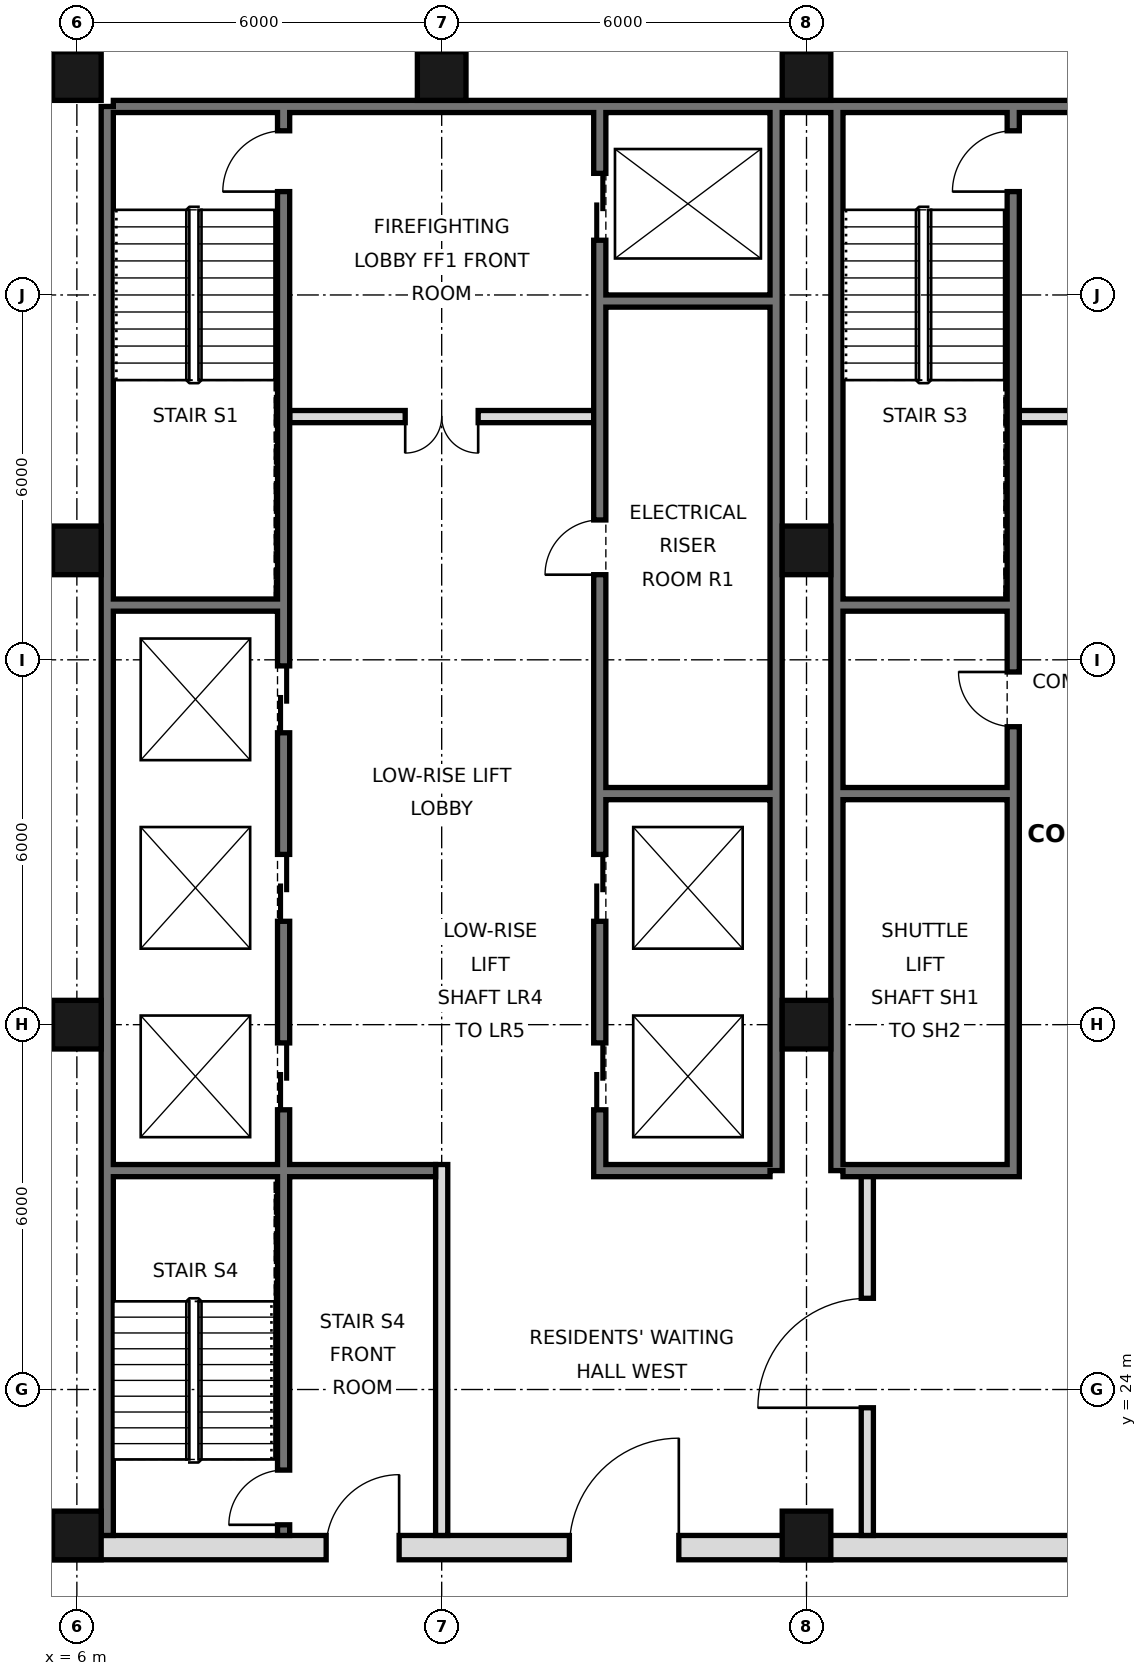
"""IFC4 building model, lengths in metres.
Left out: names, types, materials, properties, quantities, classifications, styles, units other than length and angle.
Written with IfcOpenShell. Run it as: python <this file> out.ifc"""

import sys

from ifc_helpers import new_model, si_unit, direction, frame, frame_2d, origin, origin_2d, place, context, subcontext, project, spatial, rectangle, hollow_rectangle, extrude, element, fill, save


model = new_model("IFC4")
c1 = context("Model", 3, precision=1e-05, world=origin(), true_north=direction((0.0, 1.0)))
c2 = subcontext(c1, "Body", "Model", "MODEL_VIEW")
j1 = project(units=[si_unit("LENGTHUNIT", "METRE"), si_unit("PLANEANGLEUNIT", "RADIAN")], contexts=[c1])
p1 = place(None, origin())
s1 = spatial("IfcSite", under=j1, at=p1, CompositionType="ELEMENT")
p2 = place(p1, origin())
s2 = spatial("IfcBuilding", under=s1, at=p2, CompositionType="ELEMENT")
p3 = place(p2, frame((0.0, 0.0, 107.0)))
s3 = spatial("IfcBuildingStorey", under=s2, at=p3, CompositionType="ELEMENT", Elevation=107.0)
for number, where, z_axis, x_axis in (
    (1, (6.0, 21.6, 0.0), (0.0, 0.0, 1.0), (1.0, 0.0, 0.0)),
    (2, (6.0, 30.0, 0.0), (0.0, 0.0, 1.0), (1.0, 0.0, 0.0)),
    (3, (6.0, 37.8, 0.0), (0.0, 0.0, 1.0), (1.0, 0.0, 0.0)),
    (4, (6.0, 45.6, 0.0), (0.0, 0.0, 1.0), (1.0, 0.0, 0.0)),
    (5, (12.0, 45.6, 0.0), (0.0, 0.0, 1.0), (1.0, 0.0, 0.0)),
    (6, (18.0, 21.6, 0.0), (0.0, 0.0, 1.0), (1.0, 0.0, 0.0)),
    (7, (18.0, 30.0, 0.0), (0.0, 0.0, 1.0), (1.0, 0.0, 0.0)),
    (8, (18.0, 37.8, 0.0), (0.0, 0.0, 1.0), (1.0, 0.0, 0.0)),
    (9, (18.0, 45.6, 0.0), (0.0, 0.0, 1.0), (1.0, 0.0, 0.0)),
):
    element("IfcColumn", number, at=place(p3, frame(where, z_axis=z_axis, x_axis=x_axis)), inside=s3, PredefinedType="COLUMN", context=c2, shape_type="SweptSolid", body=[
        extrude(hollow_rectangle(XDim=0.8, YDim=0.8, WallThickness=0.05, at=origin_2d()), origin(), (0.0, 0.0, 1.0), 3.6),
    ])
p4 = place(p3, frame((6.5, 21.6, 0.0), z_axis=(0.0, 0.0, 1.0), x_axis=(0.0, 1.0, 0.0)))
e10 = element("IfcWall", 10, at=p4, inside=s3, PredefinedType="SOLIDWALL", context=c2, shape_type="SweptSolid", body=[
    extrude(rectangle(XDim=23.5, YDim=0.2, at=frame_2d((11.75, 0.0))), origin(), (0.0, 0.0, 1.0), 3.42),
])
p5 = place(p3, frame((6.6, 45.1, 0.0), z_axis=(0.0, 0.0, 1.0), x_axis=(1.0, 0.0, 0.0)))
e11 = element("IfcWall", 11, at=p5, inside=s3, PredefinedType="SOLIDWALL", context=c2, shape_type="SweptSolid", body=[
    extrude(rectangle(XDim=34.8, YDim=0.2, at=frame_2d((17.4, 0.0))), origin(), (0.0, 0.0, 1.0), 3.42),
])
for number, where, z_axis, x_axis in (
    (12, (17.5, 27.6, 0.0), (0.0, 0.0, 1.0), (0.0, 1.0, 0.0)),
    (13, (18.5, 27.6, 0.0), (0.0, 0.0, 1.0), (0.0, 1.0, 0.0)),
):
    element("IfcWall", number, at=place(p3, frame(where, z_axis=z_axis, x_axis=x_axis)), inside=s3, PredefinedType="SOLIDWALL", context=c2, shape_type="SweptSolid", body=[
        extrude(rectangle(XDim=17.5, YDim=0.2, at=frame_2d((8.75, 0.0))), origin(), (0.0, 0.0, 1.0), 3.42),
    ])
p6 = place(p3, frame((5.6, 21.4, 0.0), z_axis=(0.0, 0.0, 1.0), x_axis=(1.0, 0.0, 0.0)))
e14 = element("IfcWall", 14, at=p6, inside=s3, PredefinedType="SOLIDWALL", context=c2, shape_type="SweptSolid", body=[
    extrude(rectangle(XDim=36.8, YDim=0.4, at=frame_2d((18.4, 0.0))), origin(), (0.0, 0.0, 1.0), 3.42),
])
p7 = place(p6, frame((8.5, 0.0, 0.0)))
e15 = element("IfcOpeningElement", 15, at=p7, cuts=e14, PredefinedType="OPENING", context=c2, shape_type="SweptSolid", body=[
    extrude(rectangle(XDim=1.8, YDim=2.1, at=frame_2d((0.9, 1.05))), frame((0.0, 0.21, 0.0), z_axis=(0.0, -1.0, 0.0), x_axis=(1.0, 0.0, 0.0)), (0.0, 0.0, 1.0), 0.42),
])
p8 = place(p6, frame((17.5, 0.0, 0.0)))
e16 = element("IfcOpeningElement", 16, at=p8, cuts=e14, PredefinedType="OPENING", context=c2, shape_type="SweptSolid", body=[
    extrude(rectangle(XDim=1.8, YDim=2.1, at=frame_2d((0.9, 1.05))), frame((0.0, 0.21, 0.0), z_axis=(0.0, -1.0, 0.0), x_axis=(1.0, 0.0, 0.0)), (0.0, 0.0, 1.0), 0.42),
])
p9 = place(p6, frame((26.5, 0.0, 0.0)))
e17 = element("IfcOpeningElement", 17, at=p9, cuts=e14, PredefinedType="OPENING", context=c2, shape_type="SweptSolid", body=[
    extrude(rectangle(XDim=1.8, YDim=2.1, at=frame_2d((0.9, 1.05))), frame((0.0, 0.21, 0.0), z_axis=(0.0, -1.0, 0.0), x_axis=(1.0, 0.0, 0.0)), (0.0, 0.0, 1.0), 0.42),
])
p10 = place(p6, frame((4.5, 0.0, 0.0)))
e18 = element("IfcOpeningElement", 18, at=p10, cuts=e14, PredefinedType="OPENING", context=c2, shape_type="SweptSolid", body=[
    extrude(rectangle(XDim=1.2, YDim=2.1, at=frame_2d((0.6, 1.05))), frame((0.0, 0.21, 0.0), z_axis=(0.0, -1.0, 0.0), x_axis=(1.0, 0.0, 0.0)), (0.0, 0.0, 1.0), 0.42),
])
p11 = place(p6, frame((31.1, 0.0, 0.0)))
e19 = element("IfcOpeningElement", 19, at=p11, cuts=e14, PredefinedType="OPENING", context=c2, shape_type="SweptSolid", body=[
    extrude(rectangle(XDim=1.2, YDim=2.1, at=frame_2d((0.6, 1.05))), frame((0.0, 0.21, 0.0), z_axis=(0.0, -1.0, 0.0), x_axis=(1.0, 0.0, 0.0)), (0.0, 0.0, 1.0), 0.42),
])
p12 = place(p3, frame((19.0, 21.6, 0.0), z_axis=(0.0, 0.0, 1.0), x_axis=(0.0, 1.0, 0.0)))
e20 = element("IfcWall", 20, at=p12, inside=s3, PredefinedType="PARTITIONING", context=c2, shape_type="SweptSolid", body=[
    extrude(rectangle(XDim=6.0, YDim=0.2, at=frame_2d((3.0, 0.0))), origin(), (0.0, 0.0, 1.0), 3.42),
])
p13 = place(p12, frame((2.1, 0.0, 0.0)))
e21 = element("IfcOpeningElement", 21, at=p13, cuts=e20, PredefinedType="OPENING", context=c2, shape_type="SweptSolid", body=[
    extrude(rectangle(XDim=1.8, YDim=2.1, at=frame_2d((0.9, 1.05))), frame((0.0, 0.11, 0.0), z_axis=(0.0, -1.0, 0.0), x_axis=(1.0, 0.0, 0.0)), (0.0, 0.0, 1.0), 0.22),
])
p14 = place(p3, frame((12.0, 21.6, 0.0), z_axis=(0.0, 0.0, 1.0), x_axis=(0.0, 1.0, 0.0)))
e22 = element("IfcWall", 22, at=p14, inside=s3, PredefinedType="PARTITIONING", context=c2, shape_type="SweptSolid", body=[
    extrude(rectangle(XDim=6.1, YDim=0.2, at=frame_2d((3.05, 0.0))), origin(), (0.0, 0.0, 1.0), 3.42),
])
p15 = place(p3, frame((14.6, 27.5, 0.0), z_axis=(0.0, 0.0, 1.0), x_axis=(0.0, 1.0, 0.0)))
e23 = element("IfcWall", 23, at=p15, inside=s3, PredefinedType="SOLIDWALL", context=c2, shape_type="SweptSolid", body=[
    extrude(rectangle(XDim=17.5, YDim=0.2, at=frame_2d((8.75, 0.0))), origin(), (0.0, 0.0, 1.0), 3.42),
])
p16 = place(p15, frame((1.1, 0.0, 0.0)))
e24 = element("IfcOpeningElement", 24, at=p16, cuts=e23, PredefinedType="OPENING", context=c2, shape_type="SweptSolid", body=[
    extrude(rectangle(XDim=1.1, YDim=2.1, at=frame_2d((0.55, 1.05))), frame((0.0, 0.11, 0.0), z_axis=(0.0, -1.0, 0.0), x_axis=(1.0, 0.0, 0.0)), (0.0, 0.0, 1.0), 0.22),
])
p17 = place(p15, frame((4.2, 0.0, 0.0)))
e25 = element("IfcOpeningElement", 25, at=p17, cuts=e23, PredefinedType="OPENING", context=c2, shape_type="SweptSolid", body=[
    extrude(rectangle(XDim=1.1, YDim=2.1, at=frame_2d((0.55, 1.05))), frame((0.0, 0.11, 0.0), z_axis=(0.0, -1.0, 0.0), x_axis=(1.0, 0.0, 0.0)), (0.0, 0.0, 1.0), 0.22),
])
p18 = place(p15, frame((15.4, 0.0, 0.0)))
e26 = element("IfcOpeningElement", 26, at=p18, cuts=e23, PredefinedType="OPENING", context=c2, shape_type="SweptSolid", body=[
    extrude(rectangle(XDim=1.1, YDim=2.1, at=frame_2d((0.55, 1.05))), frame((0.0, 0.11, 0.0), z_axis=(0.0, -1.0, 0.0), x_axis=(1.0, 0.0, 0.0)), (0.0, 0.0, 1.0), 0.22),
])
p19 = place(p15, frame((9.9, 0.0, 0.0)))
e27 = element("IfcOpeningElement", 27, at=p19, cuts=e23, PredefinedType="OPENING", context=c2, shape_type="SweptSolid", body=[
    extrude(rectangle(XDim=0.9, YDim=2.1, at=frame_2d((0.45, 1.05))), frame((0.0, 0.11, 0.0), z_axis=(0.0, -1.0, 0.0), x_axis=(1.0, 0.0, 0.0)), (0.0, 0.0, 1.0), 0.22),
])
p20 = place(p3, frame((21.4, 27.5, 0.0), z_axis=(0.0, 0.0, 1.0), x_axis=(0.0, 1.0, 0.0)))
e28 = element("IfcWall", 28, at=p20, inside=s3, PredefinedType="SOLIDWALL", context=c2, shape_type="SweptSolid", body=[
    extrude(rectangle(XDim=17.5, YDim=0.2, at=frame_2d((8.75, 0.0))), origin(), (0.0, 0.0, 1.0), 3.42),
])
p21 = place(p20, frame((16.2, 0.0, 0.0)))
e29 = element("IfcOpeningElement", 29, at=p21, cuts=e28, PredefinedType="OPENING", context=c2, shape_type="SweptSolid", body=[
    extrude(rectangle(XDim=1.0, YDim=2.1, at=frame_2d((0.5, 1.05))), frame((0.0, 0.11, 0.0), z_axis=(0.0, -1.0, 0.0), x_axis=(1.0, 0.0, 0.0)), (0.0, 0.0, 1.0), 0.22),
])
p22 = place(p20, frame((7.4, 0.0, 0.0)))
e30 = element("IfcOpeningElement", 30, at=p22, cuts=e28, PredefinedType="OPENING", context=c2, shape_type="SweptSolid", body=[
    extrude(rectangle(XDim=0.9, YDim=2.1, at=frame_2d((0.45, 1.05))), frame((0.0, 0.11, 0.0), z_axis=(0.0, -1.0, 0.0), x_axis=(1.0, 0.0, 0.0)), (0.0, 0.0, 1.0), 0.22),
])
p23 = place(p3, frame((9.4, 21.6, 0.0), z_axis=(0.0, 0.0, 1.0), x_axis=(0.0, 1.0, 0.0)))
e31 = element("IfcWall", 31, at=p23, inside=s3, PredefinedType="SOLIDWALL", context=c2, shape_type="SweptSolid", body=[
    extrude(rectangle(XDim=23.4, YDim=0.2, at=frame_2d((11.7, 0.0))), origin(), (0.0, 0.0, 1.0), 3.42),
])
p24 = place(p23, frame((7.0, 0.0, 0.0)))
e32 = element("IfcOpeningElement", 32, at=p24, cuts=e31, PredefinedType="OPENING", context=c2, shape_type="SweptSolid", body=[
    extrude(rectangle(XDim=1.1, YDim=2.1, at=frame_2d((0.55, 1.05))), frame((0.0, 0.11, 0.0), z_axis=(0.0, -1.0, 0.0), x_axis=(1.0, 0.0, 0.0)), (0.0, 0.0, 1.0), 0.22),
])
p25 = place(p23, frame((10.1, 0.0, 0.0)))
e33 = element("IfcOpeningElement", 33, at=p25, cuts=e31, PredefinedType="OPENING", context=c2, shape_type="SweptSolid", body=[
    extrude(rectangle(XDim=1.1, YDim=2.1, at=frame_2d((0.55, 1.05))), frame((0.0, 0.11, 0.0), z_axis=(0.0, -1.0, 0.0), x_axis=(1.0, 0.0, 0.0)), (0.0, 0.0, 1.0), 0.22),
])
p26 = place(p23, frame((13.2, 0.0, 0.0)))
e34 = element("IfcOpeningElement", 34, at=p26, cuts=e31, PredefinedType="OPENING", context=c2, shape_type="SweptSolid", body=[
    extrude(rectangle(XDim=1.1, YDim=2.1, at=frame_2d((0.55, 1.05))), frame((0.0, 0.11, 0.0), z_axis=(0.0, -1.0, 0.0), x_axis=(1.0, 0.0, 0.0)), (0.0, 0.0, 1.0), 0.22),
])
p27 = place(p23, frame((22.1, 0.0, 0.0)))
e35 = element("IfcOpeningElement", 35, at=p27, cuts=e31, PredefinedType="OPENING", context=c2, shape_type="SweptSolid", body=[
    extrude(rectangle(XDim=1.0, YDim=2.1, at=frame_2d((0.5, 1.05))), frame((0.0, 0.11, 0.0), z_axis=(0.0, -1.0, 0.0), x_axis=(1.0, 0.0, 0.0)), (0.0, 0.0, 1.0), 0.22),
])
p28 = place(p23, frame((0.175, 0.0, 0.0)))
e36 = element("IfcOpeningElement", 36, at=p28, cuts=e31, PredefinedType="OPENING", context=c2, shape_type="SweptSolid", body=[
    extrude(rectangle(XDim=0.9, YDim=2.1, at=frame_2d((0.45, 1.05))), frame((0.0, 0.11, 0.0), z_axis=(0.0, -1.0, 0.0), x_axis=(1.0, 0.0, 0.0)), (0.0, 0.0, 1.0), 0.22),
])
for number, where, z_axis, x_axis in (
    (37, (14.7, 27.6, 0.0), (0.0, 0.0, 1.0), (1.0, 0.0, 0.0)),
    (38, (18.6, 27.6, 0.0), (0.0, 0.0, 1.0), (1.0, 0.0, 0.0)),
):
    element("IfcWall", number, at=place(p3, frame(where, z_axis=z_axis, x_axis=x_axis)), inside=s3, PredefinedType="SOLIDWALL", context=c2, shape_type="SweptSolid", body=[
        extrude(rectangle(XDim=2.7, YDim=0.2, at=frame_2d((1.35, 0.0))), origin(), (0.0, 0.0, 1.0), 3.42),
    ])
p29 = place(p3, frame((6.6, 27.6, 0.0), z_axis=(0.0, 0.0, 1.0), x_axis=(1.0, 0.0, 0.0)))
e39 = element("IfcWall", 39, at=p29, inside=s3, PredefinedType="SOLIDWALL", context=c2, shape_type="SweptSolid", body=[
    extrude(rectangle(XDim=5.3, YDim=0.2, at=frame_2d((2.65, 0.0))), origin(), (0.0, 0.0, 1.0), 3.42),
])
for number, where, z_axis, x_axis in (
    (40, (14.7, 33.8, 0.0), (0.0, 0.0, 1.0), (1.0, 0.0, 0.0)),
    (41, (18.6, 33.8, 0.0), (0.0, 0.0, 1.0), (1.0, 0.0, 0.0)),
    (42, (18.6, 36.9, 0.0), (0.0, 0.0, 1.0), (1.0, 0.0, 0.0)),
    (43, (6.6, 36.9, 0.0), (0.0, 0.0, 1.0), (1.0, 0.0, 0.0)),
):
    element("IfcWall", number, at=place(p3, frame(where, z_axis=z_axis, x_axis=x_axis)), inside=s3, PredefinedType="SOLIDWALL", context=c2, shape_type="SweptSolid", body=[
        extrude(rectangle(XDim=2.7, YDim=0.2, at=frame_2d((1.35, 0.0))), origin(), (0.0, 0.0, 1.0), 3.42),
    ])
p30 = place(p3, frame((21.5, 40.0, 0.0), z_axis=(0.0, 0.0, 1.0), x_axis=(1.0, 0.0, 0.0)))
e44 = element("IfcWall", 44, at=p30, inside=s3, PredefinedType="PARTITIONING", context=c2, shape_type="SweptSolid", body=[
    extrude(rectangle(XDim=5.0, YDim=0.2, at=frame_2d((2.5, 0.0))), origin(), (0.0, 0.0, 1.0), 3.42),
])
p31 = place(p30, frame((1.9, 0.0, 0.0)))
e45 = element("IfcOpeningElement", 45, at=p31, cuts=e44, PredefinedType="OPENING", context=c2, shape_type="SweptSolid", body=[
    extrude(rectangle(XDim=1.2, YDim=2.1, at=frame_2d((0.6, 1.05))), frame((0.0, 0.11, 0.0), z_axis=(0.0, -1.0, 0.0), x_axis=(1.0, 0.0, 0.0)), (0.0, 0.0, 1.0), 0.22),
])
p32 = place(p3, frame((9.5, 40.0, 0.0), z_axis=(0.0, 0.0, 1.0), x_axis=(1.0, 0.0, 0.0)))
e46 = element("IfcWall", 46, at=p32, inside=s3, PredefinedType="PARTITIONING", context=c2, shape_type="SweptSolid", body=[
    extrude(rectangle(XDim=5.0, YDim=0.2, at=frame_2d((2.5, 0.0))), origin(), (0.0, 0.0, 1.0), 3.42),
])
p33 = place(p32, frame((1.9, 0.0, 0.0)))
e47 = element("IfcOpeningElement", 47, at=p33, cuts=e46, PredefinedType="OPENING", context=c2, shape_type="SweptSolid", body=[
    extrude(rectangle(XDim=1.2, YDim=2.1, at=frame_2d((0.6, 1.05))), frame((0.0, 0.11, 0.0), z_axis=(0.0, -1.0, 0.0), x_axis=(1.0, 0.0, 0.0)), (0.0, 0.0, 1.0), 0.22),
])
p34 = place(p3, frame((14.7, 41.9, 0.0), z_axis=(0.0, 0.0, 1.0), x_axis=(1.0, 0.0, 0.0)))
e48 = element("IfcWall", 48, at=p34, inside=s3, PredefinedType="SOLIDWALL", context=c2, shape_type="SweptSolid", body=[
    extrude(rectangle(XDim=2.7, YDim=0.2, at=frame_2d((1.35, 0.0))), origin(), (0.0, 0.0, 1.0), 3.42),
])
p35 = place(p7, frame((1.8, 0.0, 0.0), z_axis=(0.0, 0.0, 1.0), x_axis=(-1.0, 0.0, 0.0)))
e49 = element("IfcDoor", 49, at=p35, inside=s3, OperationType="SINGLE_SWING_LEFT", PredefinedType="DOOR", context=c2, shape_type="SweptSolid", body=[
    extrude(rectangle(XDim=1.8, YDim=2.1, at=frame_2d((0.9, 1.05))), frame((0.0, 0.025, 0.0), z_axis=(0.0, -1.0, 0.0), x_axis=(1.0, 0.0, 0.0)), (0.0, 0.0, 1.0), 0.05),
])
fill(e15, e49)
p36 = place(p13, origin())
e50 = element("IfcDoor", 50, at=p36, inside=s3, OperationType="SINGLE_SWING_LEFT", PredefinedType="DOOR", context=c2, shape_type="SweptSolid", body=[
    extrude(rectangle(XDim=1.8, YDim=2.1, at=frame_2d((0.9, 1.05))), frame((0.0, 0.025, 0.0), z_axis=(0.0, -1.0, 0.0), x_axis=(1.0, 0.0, 0.0)), (0.0, 0.0, 1.0), 0.05),
])
fill(e21, e50)
p37 = place(p10, frame((1.2, 0.0, 0.0), z_axis=(0.0, 0.0, 1.0), x_axis=(-1.0, 0.0, 0.0)))
e51 = element("IfcDoor", 51, at=p37, inside=s3, OperationType="SINGLE_SWING_LEFT", PredefinedType="DOOR", context=c2, shape_type="SweptSolid", body=[
    extrude(rectangle(XDim=1.2, YDim=2.1, at=frame_2d((0.6, 1.05))), frame((0.0, 0.025, 0.0), z_axis=(0.0, -1.0, 0.0), x_axis=(1.0, 0.0, 0.0)), (0.0, 0.0, 1.0), 0.05),
])
fill(e18, e51)
p38 = place(p33, frame((1.2, 0.0, 0.0), z_axis=(0.0, 0.0, 1.0), x_axis=(-1.0, 0.0, 0.0)))
e52 = element("IfcDoor", 52, at=p38, inside=s3, OperationType="DOUBLE_DOOR_SINGLE_SWING", PredefinedType="DOOR", context=c2, shape_type="SweptSolid", body=[
    extrude(rectangle(XDim=1.2, YDim=2.1, at=frame_2d((0.6, 1.05))), frame((0.0, 0.025, 0.0), z_axis=(0.0, -1.0, 0.0), x_axis=(1.0, 0.0, 0.0)), (0.0, 0.0, 1.0), 0.05),
])
fill(e47, e52)
p39 = place(p16, origin())
e53 = element("IfcDoor", 53, at=p39, inside=s3, OperationType="DOUBLE_DOOR_SLIDING", PredefinedType="DOOR", context=c2, shape_type="SweptSolid", body=[
    extrude(rectangle(XDim=1.1, YDim=2.1, at=frame_2d((0.55, 1.05))), frame((0.0, 0.025, 0.0), z_axis=(0.0, -1.0, 0.0), x_axis=(1.0, 0.0, 0.0)), (0.0, 0.0, 1.0), 0.05),
])
fill(e24, e53)
p40 = place(p17, origin())
e54 = element("IfcDoor", 54, at=p40, inside=s3, OperationType="DOUBLE_DOOR_SLIDING", PredefinedType="DOOR", context=c2, shape_type="SweptSolid", body=[
    extrude(rectangle(XDim=1.1, YDim=2.1, at=frame_2d((0.55, 1.05))), frame((0.0, 0.025, 0.0), z_axis=(0.0, -1.0, 0.0), x_axis=(1.0, 0.0, 0.0)), (0.0, 0.0, 1.0), 0.05),
])
fill(e25, e54)
p41 = place(p18, origin())
e55 = element("IfcDoor", 55, at=p41, inside=s3, OperationType="DOUBLE_DOOR_SLIDING", PredefinedType="DOOR", context=c2, shape_type="SweptSolid", body=[
    extrude(rectangle(XDim=1.1, YDim=2.1, at=frame_2d((0.55, 1.05))), frame((0.0, 0.025, 0.0), z_axis=(0.0, -1.0, 0.0), x_axis=(1.0, 0.0, 0.0)), (0.0, 0.0, 1.0), 0.05),
])
fill(e26, e55)
p42 = place(p24, origin())
e56 = element("IfcDoor", 56, at=p42, inside=s3, OperationType="DOUBLE_DOOR_SLIDING", PredefinedType="DOOR", context=c2, shape_type="SweptSolid", body=[
    extrude(rectangle(XDim=1.1, YDim=2.1, at=frame_2d((0.55, 1.05))), frame((0.0, 0.025, 0.0), z_axis=(0.0, -1.0, 0.0), x_axis=(1.0, 0.0, 0.0)), (0.0, 0.0, 1.0), 0.05),
])
fill(e32, e56)
p43 = place(p25, origin())
e57 = element("IfcDoor", 57, at=p43, inside=s3, OperationType="DOUBLE_DOOR_SLIDING", PredefinedType="DOOR", context=c2, shape_type="SweptSolid", body=[
    extrude(rectangle(XDim=1.1, YDim=2.1, at=frame_2d((0.55, 1.05))), frame((0.0, 0.025, 0.0), z_axis=(0.0, -1.0, 0.0), x_axis=(1.0, 0.0, 0.0)), (0.0, 0.0, 1.0), 0.05),
])
fill(e33, e57)
p44 = place(p26, origin())
e58 = element("IfcDoor", 58, at=p44, inside=s3, OperationType="DOUBLE_DOOR_SLIDING", PredefinedType="DOOR", context=c2, shape_type="SweptSolid", body=[
    extrude(rectangle(XDim=1.1, YDim=2.1, at=frame_2d((0.55, 1.05))), frame((0.0, 0.025, 0.0), z_axis=(0.0, -1.0, 0.0), x_axis=(1.0, 0.0, 0.0)), (0.0, 0.0, 1.0), 0.05),
])
fill(e34, e58)
p45 = place(p27, origin())
e59 = element("IfcDoor", 59, at=p45, inside=s3, OperationType="SINGLE_SWING_LEFT", PredefinedType="DOOR", context=c2, shape_type="SweptSolid", body=[
    extrude(rectangle(XDim=1.0, YDim=2.1, at=frame_2d((0.5, 1.05))), frame((0.0, 0.025, 0.0), z_axis=(0.0, -1.0, 0.0), x_axis=(1.0, 0.0, 0.0)), (0.0, 0.0, 1.0), 0.05),
])
fill(e35, e59)
p46 = place(p21, origin())
e60 = element("IfcDoor", 60, at=p46, inside=s3, OperationType="SINGLE_SWING_LEFT", PredefinedType="DOOR", context=c2, shape_type="SweptSolid", body=[
    extrude(rectangle(XDim=1.0, YDim=2.1, at=frame_2d((0.5, 1.05))), frame((0.0, 0.025, 0.0), z_axis=(0.0, -1.0, 0.0), x_axis=(1.0, 0.0, 0.0)), (0.0, 0.0, 1.0), 0.05),
])
fill(e29, e60)
p47 = place(p28, origin())
e61 = element("IfcDoor", 61, at=p47, inside=s3, OperationType="SINGLE_SWING_LEFT", PredefinedType="DOOR", context=c2, shape_type="SweptSolid", body=[
    extrude(rectangle(XDim=0.9, YDim=2.1, at=frame_2d((0.45, 1.05))), frame((0.0, 0.025, 0.0), z_axis=(0.0, -1.0, 0.0), x_axis=(1.0, 0.0, 0.0)), (0.0, 0.0, 1.0), 0.05),
])
fill(e36, e61)
p48 = place(p19, origin())
e62 = element("IfcDoor", 62, at=p48, inside=s3, OperationType="SINGLE_SWING_LEFT", PredefinedType="DOOR", context=c2, shape_type="SweptSolid", body=[
    extrude(rectangle(XDim=0.9, YDim=2.1, at=frame_2d((0.45, 1.05))), frame((0.0, 0.025, 0.0), z_axis=(0.0, -1.0, 0.0), x_axis=(1.0, 0.0, 0.0)), (0.0, 0.0, 1.0), 0.05),
])
fill(e27, e62)
p49 = place(p22, frame((0.9, 0.0, 0.0), z_axis=(0.0, 0.0, 1.0), x_axis=(-1.0, 0.0, 0.0)))
e63 = element("IfcDoor", 63, at=p49, inside=s3, OperationType="SINGLE_SWING_LEFT", PredefinedType="DOOR", context=c2, shape_type="SweptSolid", body=[
    extrude(rectangle(XDim=0.9, YDim=2.1, at=frame_2d((0.45, 1.05))), frame((0.0, 0.025, 0.0), z_axis=(0.0, -1.0, 0.0), x_axis=(1.0, 0.0, 0.0)), (0.0, 0.0, 1.0), 0.05),
])
fill(e30, e63)
save(model, sys.argv[1])
